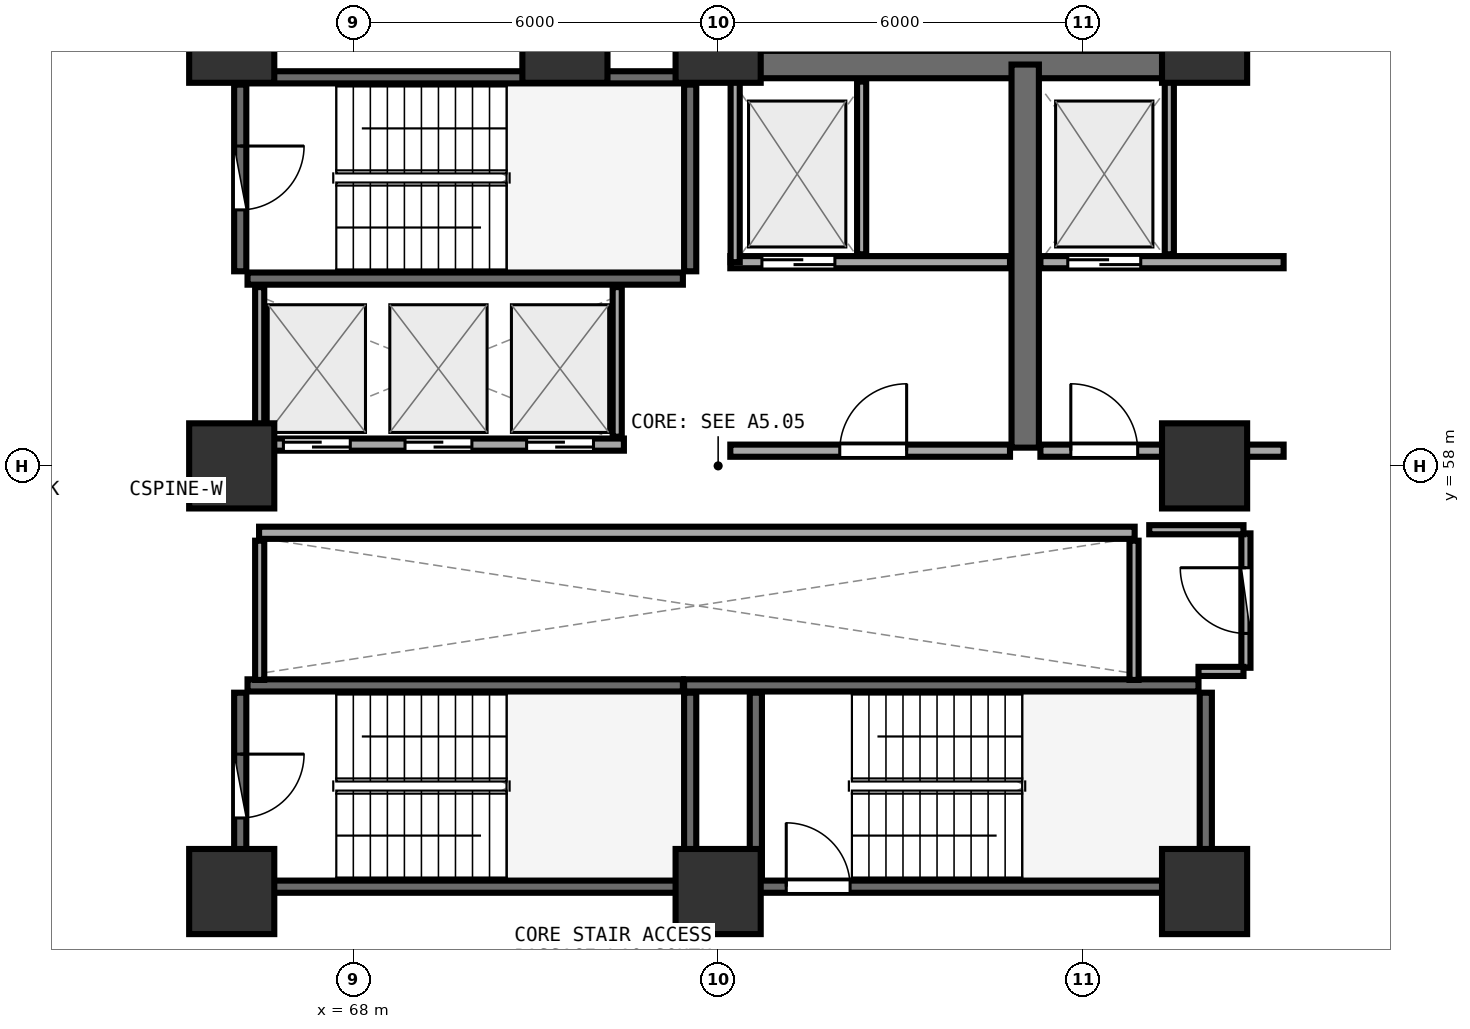
"""IFC4 building model, lengths in metres.
Left out: names, types, materials, properties, quantities, classifications, styles, units other than length and angle.
Written with IfcOpenShell. Run it as: python <this file> out.ifc"""

import sys

from ifc_helpers import new_model, si_unit, direction, frame, frame_2d, origin, origin_2d, place, context, subcontext, project, spatial, rectangle, extrude, element, fill, save


model = new_model("IFC4")
c1 = context("Model", 3, precision=1e-05, world=origin(), true_north=direction((0.0, 1.0)))
c2 = subcontext(c1, "Body", "Model", "MODEL_VIEW")
j1 = project(units=[si_unit("LENGTHUNIT", "METRE"), si_unit("PLANEANGLEUNIT", "RADIAN")], contexts=[c1])
p1 = place(None, origin())
s1 = spatial("IfcSite", under=j1, at=p1, CompositionType="ELEMENT")
p2 = place(p1, origin())
s2 = spatial("IfcBuilding", under=s1, at=p2, CompositionType="ELEMENT")
p3 = place(p2, frame((0.0, 0.0, 41.25)))
s3 = spatial("IfcBuildingStorey", under=s2, at=p3, CompositionType="ELEMENT", Elevation=41.25)
for number, where, z_axis, x_axis in (
    (1, (66.0, 51.0, 0.0), (0.0, 0.0, 1.0), (1.0, 0.0, 0.0)),
    (2, (74.0, 51.0, 0.0), (0.0, 0.0, 1.0), (1.0, 0.0, 0.0)),
    (3, (82.0, 51.0, 0.0), (0.0, 0.0, 1.0), (1.0, 0.0, 0.0)),
    (4, (82.0, 58.0, 0.0), (0.0, 0.0, 1.0), (1.0, 0.0, 0.0)),
    (5, (82.0, 65.0, 0.0), (0.0, 0.0, 1.0), (1.0, 0.0, 0.0)),
    (6, (74.0, 65.0, 0.0), (0.0, 0.0, 1.0), (1.0, 0.0, 0.0)),
    (7, (71.48, 65.0, 0.0), (0.0, 0.0, 1.0), (1.0, 0.0, 0.0)),
    (8, (66.0, 65.0, 0.0), (0.0, 0.0, 1.0), (1.0, 0.0, 0.0)),
    (9, (66.0, 58.0, 0.0), (0.0, 0.0, 1.0), (1.0, 0.0, 0.0)),
):
    element("IfcColumn", number, at=place(p3, frame(where, z_axis=z_axis, x_axis=x_axis)), inside=s3, PredefinedType="PILASTER", context=c2, shape_type="SweptSolid", body=[
        extrude(rectangle(XDim=1.4, YDim=1.4, at=origin_2d()), origin(), (0.0, 0.0, 1.0), 3.75),
    ])
p4 = place(p3, frame((66.26, 61.08, 0.0), z_axis=(0.0, 0.0, 1.0), x_axis=(1.0, 0.0, 0.0)))
e10 = element("IfcWall", 10, at=p4, inside=s3, PredefinedType="SHEAR", context=c2, shape_type="SweptSolid", body=[
    extrude(rectangle(XDim=7.16, YDim=0.2, at=frame_2d((3.58, 0.0))), origin(), (0.0, 0.0, 1.0), 3.49),
])
p5 = place(p3, frame((73.54, 61.2, 0.0), z_axis=(0.0, 0.0, 1.0), x_axis=(0.0, 1.0, 0.0)))
e11 = element("IfcWall", 11, at=p5, inside=s3, PredefinedType="SHEAR", context=c2, shape_type="SweptSolid", body=[
    extrude(rectangle(XDim=3.07, YDim=0.2, at=frame_2d((1.535, 0.0))), origin(), (0.0, 0.0, 1.0), 3.49),
])
p6 = place(p3, frame((73.42, 64.39, 0.0), z_axis=(0.0, 0.0, 1.0), x_axis=(-1.0, 0.0, 0.0)))
e12 = element("IfcWall", 12, at=p6, inside=s3, PredefinedType="SHEAR", context=c2, shape_type="SweptSolid", body=[
    extrude(rectangle(XDim=7.16, YDim=0.2, at=frame_2d((3.58, 0.0))), origin(), (0.0, 0.0, 1.0), 3.49),
])
p7 = place(p3, frame((66.14, 64.27, 0.0), z_axis=(0.0, 0.0, 1.0), x_axis=(0.0, -1.0, 0.0)))
e13 = element("IfcWall", 13, at=p7, inside=s3, PredefinedType="SHEAR", context=c2, shape_type="SweptSolid", body=[
    extrude(rectangle(XDim=3.07, YDim=0.2, at=frame_2d((1.535, 0.0))), origin(), (0.0, 0.0, 1.0), 3.49),
])
p8 = place(p7, frame((1.01, 0.0, 0.0)))
e14 = element("IfcOpeningElement", 14, at=p8, cuts=e13, PredefinedType="OPENING", context=c2, shape_type="SweptSolid", body=[
    extrude(rectangle(XDim=1.05, YDim=2.1, at=frame_2d((0.525, 1.05))), frame((0.0, 0.11, 0.0), z_axis=(0.0, -1.0, 0.0), x_axis=(1.0, 0.0, 0.0)), (0.0, 0.0, 1.0), 0.22),
])
p9 = place(p3, frame((74.0, 51.08, 0.0), z_axis=(0.0, 0.0, 1.0), x_axis=(1.0, 0.0, 0.0)))
e15 = element("IfcWall", 15, at=p9, inside=s3, PredefinedType="SHEAR", context=c2, shape_type="SweptSolid", body=[
    extrude(rectangle(XDim=7.9, YDim=0.2, at=frame_2d((3.95, 0.0))), origin(), (0.0, 0.0, 1.0), 3.49),
])
p10 = place(p9, frame((1.12, 0.0, 0.0)))
e16 = element("IfcOpeningElement", 16, at=p10, cuts=e15, PredefinedType="OPENING", context=c2, shape_type="SweptSolid", body=[
    extrude(rectangle(XDim=1.05, YDim=2.1, at=frame_2d((0.525, 1.05))), frame((0.0, 0.11, 0.0), z_axis=(0.0, -1.0, 0.0), x_axis=(1.0, 0.0, 0.0)), (0.0, 0.0, 1.0), 0.22),
])
p11 = place(p3, frame((82.02, 51.2, 0.0), z_axis=(0.0, 0.0, 1.0), x_axis=(0.0, 1.0, 0.0)))
e17 = element("IfcWall", 17, at=p11, inside=s3, PredefinedType="SHEAR", context=c2, shape_type="SweptSolid", body=[
    extrude(rectangle(XDim=3.07, YDim=0.2, at=frame_2d((1.535, 0.0))), origin(), (0.0, 0.0, 1.0), 3.49),
])
p12 = place(p3, frame((81.9, 54.39, 0.0), z_axis=(0.0, 0.0, 1.0), x_axis=(-1.0, 0.0, 0.0)))
e18 = element("IfcWall", 18, at=p12, inside=s3, PredefinedType="SHEAR", context=c2, shape_type="SweptSolid", body=[
    extrude(rectangle(XDim=8.46, YDim=0.2, at=frame_2d((4.23, 0.0))), origin(), (0.0, 0.0, 1.0), 3.49),
])
p13 = place(p3, frame((74.62, 54.27, 0.0), z_axis=(0.0, 0.0, 1.0), x_axis=(0.0, -1.0, 0.0)))
e19 = element("IfcWall", 19, at=p13, inside=s3, PredefinedType="SHEAR", context=c2, shape_type="SweptSolid", body=[
    extrude(rectangle(XDim=3.07, YDim=0.2, at=frame_2d((1.535, 0.0))), origin(), (0.0, 0.0, 1.0), 3.49),
])
p14 = place(p3, frame((66.26, 51.08, 0.0), z_axis=(0.0, 0.0, 1.0), x_axis=(1.0, 0.0, 0.0)))
e20 = element("IfcWall", 20, at=p14, inside=s3, PredefinedType="SHEAR", context=c2, shape_type="SweptSolid", body=[
    extrude(rectangle(XDim=7.16, YDim=0.2, at=frame_2d((3.58, 0.0))), origin(), (0.0, 0.0, 1.0), 3.49),
])
p15 = place(p3, frame((73.54, 51.2, 0.0), z_axis=(0.0, 0.0, 1.0), x_axis=(0.0, 1.0, 0.0)))
e21 = element("IfcWall", 21, at=p15, inside=s3, PredefinedType="SHEAR", context=c2, shape_type="SweptSolid", body=[
    extrude(rectangle(XDim=3.07, YDim=0.2, at=frame_2d((1.535, 0.0))), origin(), (0.0, 0.0, 1.0), 3.49),
])
p16 = place(p3, frame((73.42, 54.39, 0.0), z_axis=(0.0, 0.0, 1.0), x_axis=(-1.0, 0.0, 0.0)))
e22 = element("IfcWall", 22, at=p16, inside=s3, PredefinedType="SHEAR", context=c2, shape_type="SweptSolid", body=[
    extrude(rectangle(XDim=7.16, YDim=0.2, at=frame_2d((3.58, 0.0))), origin(), (0.0, 0.0, 1.0), 3.49),
])
p17 = place(p3, frame((66.14, 54.27, 0.0), z_axis=(0.0, 0.0, 1.0), x_axis=(0.0, -1.0, 0.0)))
e23 = element("IfcWall", 23, at=p17, inside=s3, PredefinedType="SHEAR", context=c2, shape_type="SweptSolid", body=[
    extrude(rectangle(XDim=3.07, YDim=0.2, at=frame_2d((1.535, 0.0))), origin(), (0.0, 0.0, 1.0), 3.49),
])
p18 = place(p17, frame((1.01, 0.0, 0.0)))
e24 = element("IfcOpeningElement", 24, at=p18, cuts=e23, PredefinedType="OPENING", context=c2, shape_type="SweptSolid", body=[
    extrude(rectangle(XDim=1.05, YDim=2.1, at=frame_2d((0.525, 1.05))), frame((0.0, 0.11, 0.0), z_axis=(0.0, -1.0, 0.0), x_axis=(1.0, 0.0, 0.0)), (0.0, 0.0, 1.0), 0.22),
])
p19 = place(p3, frame((74.0, 64.6, 0.0), z_axis=(0.0, 0.0, 1.0), x_axis=(1.0, 0.0, 0.0)))
e25 = element("IfcWall", 25, at=p19, inside=s3, PredefinedType="SHEAR", context=c2, shape_type="SweptSolid", body=[
    extrude(rectangle(XDim=8.0, YDim=0.45, at=frame_2d((4.0, 0.0))), origin(), (0.0, 0.0, 1.0), 3.49),
])
p20 = place(p3, frame((79.05, 58.3, 0.0), z_axis=(0.0, 0.0, 1.0), x_axis=(0.0, 1.0, 0.0)))
e26 = element("IfcWall", 26, at=p20, inside=s3, PredefinedType="SHEAR", context=c2, shape_type="SweptSolid", body=[
    extrude(rectangle(XDim=6.3, YDim=0.45, at=frame_2d((3.15, 0.0))), origin(), (0.0, 0.0, 1.0), 3.49),
])
p21 = place(p3, frame((74.2, 61.35, 0.0), z_axis=(0.0, 0.0, 1.0), x_axis=(1.0, 0.0, 0.0)))
e27 = element("IfcWall", 27, at=p21, inside=s3, PredefinedType="SOLIDWALL", context=c2, shape_type="SweptSolid", body=[
    extrude(rectangle(XDim=4.6, YDim=0.2, at=frame_2d((2.3, 0.0))), origin(), (0.0, 0.0, 1.0), 3.48),
])
p22 = place(p21, frame((0.52, 0.0, 0.0)))
e28 = element("IfcOpeningElement", 28, at=p22, cuts=e27, PredefinedType="OPENING", context=c2, shape_type="SweptSolid", body=[
    extrude(rectangle(XDim=1.2, YDim=2.15, at=frame_2d((0.6, 1.075))), frame((0.0, 0.11, 0.0), z_axis=(0.0, -1.0, 0.0), x_axis=(1.0, 0.0, 0.0)), (0.0, 0.0, 1.0), 0.22),
])
p23 = place(p3, frame((74.28, 61.35, 0.0), z_axis=(0.0, 0.0, 1.0), x_axis=(0.0, 1.0, 0.0)))
e29 = element("IfcWall", 29, at=p23, inside=s3, PredefinedType="PARTITIONING", context=c2, shape_type="SweptSolid", body=[
    extrude(rectangle(XDim=2.97, YDim=0.15, at=frame_2d((1.485, 0.0))), origin(), (0.0, 0.0, 1.0), 3.48),
])
p24 = place(p3, frame((76.36, 61.48, 0.0), z_axis=(0.0, 0.0, 1.0), x_axis=(0.0, 1.0, 0.0)))
e30 = element("IfcWall", 30, at=p24, inside=s3, PredefinedType="PARTITIONING", context=c2, shape_type="SweptSolid", body=[
    extrude(rectangle(XDim=2.84, YDim=0.15, at=frame_2d((1.42, 0.0))), origin(), (0.0, 0.0, 1.0), 3.48),
])
p25 = place(p3, frame((79.3, 61.35, 0.0), z_axis=(0.0, 0.0, 1.0), x_axis=(1.0, 0.0, 0.0)))
e31 = element("IfcWall", 31, at=p25, inside=s3, PredefinedType="SOLIDWALL", context=c2, shape_type="SweptSolid", body=[
    extrude(rectangle(XDim=4.0, YDim=0.2, at=frame_2d((2.0, 0.0))), origin(), (0.0, 0.0, 1.0), 2.775),
])
p26 = place(p25, frame((0.45, 0.0, 0.0)))
e32 = element("IfcOpeningElement", 32, at=p26, cuts=e31, PredefinedType="OPENING", context=c2, shape_type="SweptSolid", body=[
    extrude(rectangle(XDim=1.2, YDim=2.15, at=frame_2d((0.6, 1.075))), frame((0.0, 0.11, 0.0), z_axis=(0.0, -1.0, 0.0), x_axis=(1.0, 0.0, 0.0)), (0.0, 0.0, 1.0), 0.22),
])
p27 = place(p3, frame((81.42, 61.48, 0.0), z_axis=(0.0, 0.0, 1.0), x_axis=(0.0, 1.0, 0.0)))
e33 = element("IfcWall", 33, at=p27, inside=s3, PredefinedType="PARTITIONING", context=c2, shape_type="SweptSolid", body=[
    extrude(rectangle(XDim=2.84, YDim=0.15, at=frame_2d((1.42, 0.0))), origin(), (0.0, 0.0, 1.0), 3.48),
])
p28 = place(p3, frame((74.2, 58.25, 0.0), z_axis=(0.0, 0.0, 1.0), x_axis=(1.0, 0.0, 0.0)))
e34 = element("IfcWall", 34, at=p28, inside=s3, PredefinedType="SOLIDWALL", context=c2, shape_type="SweptSolid", body=[
    extrude(rectangle(XDim=4.6, YDim=0.2, at=frame_2d((2.3, 0.0))), origin(), (0.0, 0.0, 1.0), 3.48),
])
p29 = place(p28, frame((1.8, 0.0, 0.0)))
e35 = element("IfcOpeningElement", 35, at=p29, cuts=e34, PredefinedType="OPENING", context=c2, shape_type="SweptSolid", body=[
    extrude(rectangle(XDim=1.1, YDim=2.1, at=frame_2d((0.55, 1.05))), frame((0.0, 0.11, 0.0), z_axis=(0.0, -1.0, 0.0), x_axis=(1.0, 0.0, 0.0)), (0.0, 0.0, 1.0), 0.22),
])
p30 = place(p3, frame((79.3, 58.25, 0.0), z_axis=(0.0, 0.0, 1.0), x_axis=(1.0, 0.0, 0.0)))
e36 = element("IfcWall", 36, at=p30, inside=s3, PredefinedType="SOLIDWALL", context=c2, shape_type="SweptSolid", body=[
    extrude(rectangle(XDim=4.0, YDim=0.2, at=frame_2d((2.0, 0.0))), origin(), (0.0, 0.0, 1.0), 2.775),
])
p31 = place(p30, frame((0.5, 0.0, 0.0)))
e37 = element("IfcOpeningElement", 37, at=p31, cuts=e36, PredefinedType="OPENING", context=c2, shape_type="SweptSolid", body=[
    extrude(rectangle(XDim=1.1, YDim=2.1, at=frame_2d((0.55, 1.05))), frame((0.0, 0.11, 0.0), z_axis=(0.0, -1.0, 0.0), x_axis=(1.0, 0.0, 0.0)), (0.0, 0.0, 1.0), 0.22),
])
p32 = place(p3, frame((66.45, 58.35, 0.0), z_axis=(0.0, 0.0, 1.0), x_axis=(1.0, 0.0, 0.0)))
e38 = element("IfcWall", 38, at=p32, inside=s3, PredefinedType="SOLIDWALL", context=c2, shape_type="SweptSolid", body=[
    extrude(rectangle(XDim=6.0, YDim=0.2, at=frame_2d((3.0, 0.0))), origin(), (0.0, 0.0, 1.0), 3.48),
])
p33 = place(p32, frame((0.4, 0.0, 0.0)))
e39 = element("IfcOpeningElement", 39, at=p33, cuts=e38, PredefinedType="OPENING", context=c2, shape_type="SweptSolid", body=[
    extrude(rectangle(XDim=1.1, YDim=2.1, at=frame_2d((0.55, 1.05))), frame((0.0, 0.11, 0.0), z_axis=(0.0, -1.0, 0.0), x_axis=(1.0, 0.0, 0.0)), (0.0, 0.0, 1.0), 0.22),
])
p34 = place(p32, frame((2.4, 0.0, 0.0)))
e40 = element("IfcOpeningElement", 40, at=p34, cuts=e38, PredefinedType="OPENING", context=c2, shape_type="SweptSolid", body=[
    extrude(rectangle(XDim=1.1, YDim=2.1, at=frame_2d((0.55, 1.05))), frame((0.0, 0.11, 0.0), z_axis=(0.0, -1.0, 0.0), x_axis=(1.0, 0.0, 0.0)), (0.0, 0.0, 1.0), 0.22),
])
p35 = place(p32, frame((4.4, 0.0, 0.0)))
e41 = element("IfcOpeningElement", 41, at=p35, cuts=e38, PredefinedType="OPENING", context=c2, shape_type="SweptSolid", body=[
    extrude(rectangle(XDim=1.1, YDim=2.1, at=frame_2d((0.55, 1.05))), frame((0.0, 0.11, 0.0), z_axis=(0.0, -1.0, 0.0), x_axis=(1.0, 0.0, 0.0)), (0.0, 0.0, 1.0), 0.22),
])
for number, where, z_axis, x_axis in (
    (42, (66.46, 58.48, 0.0), (0.0, 0.0, 1.0), (0.0, 1.0, 0.0)),
    (43, (72.34, 58.48, 0.0), (0.0, 0.0, 1.0), (0.0, 1.0, 0.0)),
):
    element("IfcWall", number, at=place(p3, frame(where, z_axis=z_axis, x_axis=x_axis)), inside=s3, PredefinedType="PARTITIONING", context=c2, shape_type="SweptSolid", body=[
        extrude(rectangle(XDim=2.46, YDim=0.15, at=frame_2d((1.23, 0.0))), origin(), (0.0, 0.0, 1.0), 3.48),
    ])
p36 = place(p3, frame((66.45, 56.9, 0.0), z_axis=(0.0, 0.0, 1.0), x_axis=(1.0, 0.0, 0.0)))
e44 = element("IfcWall", 44, at=p36, inside=s3, PredefinedType="SOLIDWALL", context=c2, shape_type="SweptSolid", body=[
    extrude(rectangle(XDim=14.4, YDim=0.2, at=frame_2d((7.2, 0.0))), origin(), (0.0, 0.0, 1.0), 3.48),
])
for number, where, z_axis, x_axis in (
    (45, (66.46, 54.48, 0.0), (0.0, 0.0, 1.0), (0.0, 1.0, 0.0)),
    (46, (80.84, 54.48, 0.0), (0.0, 0.0, 1.0), (0.0, 1.0, 0.0)),
):
    element("IfcWall", number, at=place(p3, frame(where, z_axis=z_axis, x_axis=x_axis)), inside=s3, PredefinedType="PARTITIONING", context=c2, shape_type="SweptSolid", body=[
        extrude(rectangle(XDim=2.29, YDim=0.15, at=frame_2d((1.145, 0.0))), origin(), (0.0, 0.0, 1.0), 3.48),
    ])
p37 = place(p3, frame((82.68, 54.68, 0.0), z_axis=(0.0, 0.0, 1.0), x_axis=(0.0, 1.0, 0.0)))
e47 = element("IfcWall", 47, at=p37, inside=s3, PredefinedType="PARTITIONING", context=c2, shape_type="SweptSolid", body=[
    extrude(rectangle(XDim=2.21, YDim=0.15, at=frame_2d((1.105, 0.0))), origin(), (0.0, 0.0, 1.0), 3.48),
])
p38 = place(p37, frame((0.565, 0.0, 0.0)))
e48 = element("IfcOpeningElement", 48, at=p38, cuts=e47, PredefinedType="OPENING", context=c2, shape_type="SweptSolid", body=[
    extrude(rectangle(XDim=1.08, YDim=2.1, at=frame_2d((0.54, 1.05))), frame((0.0, 0.085, 0.0), z_axis=(0.0, -1.0, 0.0), x_axis=(1.0, 0.0, 0.0)), (0.0, 0.0, 1.0), 0.17),
])
p39 = place(p3, frame((82.165, 46.57, 0.0), z_axis=(0.0, 0.0, 1.0), x_axis=(0.752285806045, 0.658836903963, 0.0)))
e49 = element("IfcWall", 49, at=p39, inside=s3, PredefinedType="PARTITIONING", context=c2, shape_type="SweptSolid", body=[
    extrude(rectangle(XDim=5.512, YDim=0.12, at=frame_2d((2.756, 0.0))), origin(), (0.0, 0.0, 1.0), 2.875),
])
p40 = place(p39, frame((2.306, 0.0, 0.0)))
e50 = element("IfcOpeningElement", 50, at=p40, cuts=e49, PredefinedType="OPENING", context=c2, shape_type="SweptSolid", body=[
    extrude(rectangle(XDim=0.9, YDim=2.08, at=frame_2d((0.45, 1.04))), frame((0.0, 0.07, 0.0), z_axis=(0.0, -1.0, 0.0), x_axis=(1.0, 0.0, 0.0)), (0.0, 0.0, 1.0), 0.14),
])
p41 = place(p3, frame((81.9, 54.62, 0.0), z_axis=(0.0, 0.0, 1.0), x_axis=(1.0, 0.0, 0.0)))
e51 = element("IfcWall", 51, at=p41, inside=s3, PredefinedType="PARTITIONING", context=c2, shape_type="SweptSolid", body=[
    extrude(rectangle(XDim=0.74, YDim=0.15, at=frame_2d((0.37, 0.0))), origin(), (0.0, 0.0, 1.0), 2.775),
])
p42 = place(p3, frame((82.64, 56.95, 0.0), z_axis=(0.0, 0.0, 1.0), x_axis=(-1.0, 0.0, 0.0)))
e52 = element("IfcWall", 52, at=p42, inside=s3, PredefinedType="PARTITIONING", context=c2, shape_type="SweptSolid", body=[
    extrude(rectangle(XDim=1.55, YDim=0.15, at=frame_2d((0.775, 0.0))), origin(), (0.0, 0.0, 1.0), 2.775),
])
p43 = place(p8, origin())
e53 = element("IfcDoor", 53, at=p43, inside=s3, OperationType="SINGLE_SWING_LEFT", PredefinedType="DOOR", context=c2, shape_type="SweptSolid", body=[
    extrude(rectangle(XDim=1.05, YDim=2.1, at=frame_2d((0.525, 1.05))), frame((0.0, 0.025, 0.0), z_axis=(0.0, -1.0, 0.0), x_axis=(1.0, 0.0, 0.0)), (0.0, 0.0, 1.0), 0.05),
])
fill(e14, e53)
p44 = place(p10, origin())
e54 = element("IfcDoor", 54, at=p44, inside=s3, OperationType="SINGLE_SWING_LEFT", PredefinedType="DOOR", context=c2, shape_type="SweptSolid", body=[
    extrude(rectangle(XDim=1.05, YDim=2.1, at=frame_2d((0.525, 1.05))), frame((0.0, 0.025, 0.0), z_axis=(0.0, -1.0, 0.0), x_axis=(1.0, 0.0, 0.0)), (0.0, 0.0, 1.0), 0.05),
])
fill(e16, e54)
p45 = place(p18, origin())
e55 = element("IfcDoor", 55, at=p45, inside=s3, OperationType="SINGLE_SWING_LEFT", PredefinedType="DOOR", context=c2, shape_type="SweptSolid", body=[
    extrude(rectangle(XDim=1.05, YDim=2.1, at=frame_2d((0.525, 1.05))), frame((0.0, 0.025, 0.0), z_axis=(0.0, -1.0, 0.0), x_axis=(1.0, 0.0, 0.0)), (0.0, 0.0, 1.0), 0.05),
])
fill(e24, e55)
p46 = place(p22, origin())
e56 = element("IfcDoor", 56, at=p46, inside=s3, OperationType="DOUBLE_DOOR_SLIDING", PredefinedType="DOOR", context=c2, shape_type="SweptSolid", body=[
    extrude(rectangle(XDim=1.2, YDim=2.15, at=frame_2d((0.6, 1.075))), frame((0.0, 0.025, 0.0), z_axis=(0.0, -1.0, 0.0), x_axis=(1.0, 0.0, 0.0)), (0.0, 0.0, 1.0), 0.05),
])
fill(e28, e56)
p47 = place(p26, origin())
e57 = element("IfcDoor", 57, at=p47, inside=s3, OperationType="DOUBLE_DOOR_SLIDING", PredefinedType="DOOR", context=c2, shape_type="SweptSolid", body=[
    extrude(rectangle(XDim=1.2, YDim=2.15, at=frame_2d((0.6, 1.075))), frame((0.0, 0.025, 0.0), z_axis=(0.0, -1.0, 0.0), x_axis=(1.0, 0.0, 0.0)), (0.0, 0.0, 1.0), 0.05),
])
fill(e32, e57)
p48 = place(p29, frame((1.1, 0.0, 0.0), z_axis=(0.0, 0.0, 1.0), x_axis=(-1.0, 0.0, 0.0)))
e58 = element("IfcDoor", 58, at=p48, inside=s3, OperationType="SINGLE_SWING_LEFT", PredefinedType="DOOR", context=c2, shape_type="SweptSolid", body=[
    extrude(rectangle(XDim=1.1, YDim=2.1, at=frame_2d((0.55, 1.05))), frame((0.0, 0.025, 0.0), z_axis=(0.0, -1.0, 0.0), x_axis=(1.0, 0.0, 0.0)), (0.0, 0.0, 1.0), 0.05),
])
fill(e35, e58)
p49 = place(p31, frame((1.1, 0.0, 0.0), z_axis=(0.0, 0.0, 1.0), x_axis=(-1.0, 0.0, 0.0)))
e59 = element("IfcDoor", 59, at=p49, inside=s3, OperationType="SINGLE_SWING_RIGHT", PredefinedType="DOOR", context=c2, shape_type="SweptSolid", body=[
    extrude(rectangle(XDim=1.1, YDim=2.1, at=frame_2d((0.55, 1.05))), frame((0.0, 0.025, 0.0), z_axis=(0.0, -1.0, 0.0), x_axis=(1.0, 0.0, 0.0)), (0.0, 0.0, 1.0), 0.05),
])
fill(e37, e59)
p50 = place(p33, origin())
e60 = element("IfcDoor", 60, at=p50, inside=s3, OperationType="DOUBLE_DOOR_SLIDING", PredefinedType="DOOR", context=c2, shape_type="SweptSolid", body=[
    extrude(rectangle(XDim=1.1, YDim=2.1, at=frame_2d((0.55, 1.05))), frame((0.0, 0.025, 0.0), z_axis=(0.0, -1.0, 0.0), x_axis=(1.0, 0.0, 0.0)), (0.0, 0.0, 1.0), 0.05),
])
fill(e39, e60)
p51 = place(p34, origin())
e61 = element("IfcDoor", 61, at=p51, inside=s3, OperationType="DOUBLE_DOOR_SLIDING", PredefinedType="DOOR", context=c2, shape_type="SweptSolid", body=[
    extrude(rectangle(XDim=1.1, YDim=2.1, at=frame_2d((0.55, 1.05))), frame((0.0, 0.025, 0.0), z_axis=(0.0, -1.0, 0.0), x_axis=(1.0, 0.0, 0.0)), (0.0, 0.0, 1.0), 0.05),
])
fill(e40, e61)
p52 = place(p35, origin())
e62 = element("IfcDoor", 62, at=p52, inside=s3, OperationType="DOUBLE_DOOR_SLIDING", PredefinedType="DOOR", context=c2, shape_type="SweptSolid", body=[
    extrude(rectangle(XDim=1.1, YDim=2.1, at=frame_2d((0.55, 1.05))), frame((0.0, 0.025, 0.0), z_axis=(0.0, -1.0, 0.0), x_axis=(1.0, 0.0, 0.0)), (0.0, 0.0, 1.0), 0.05),
])
fill(e41, e62)
p53 = place(p38, origin())
e63 = element("IfcDoor", 63, at=p53, inside=s3, OperationType="SINGLE_SWING_RIGHT", PredefinedType="DOOR", context=c2, shape_type="SweptSolid", body=[
    extrude(rectangle(XDim=1.08, YDim=2.1, at=frame_2d((0.54, 1.05))), frame((0.0, 0.025, 0.0), z_axis=(0.0, -1.0, 0.0), x_axis=(1.0, 0.0, 0.0)), (0.0, 0.0, 1.0), 0.05),
])
fill(e48, e63)
save(model, sys.argv[1])
